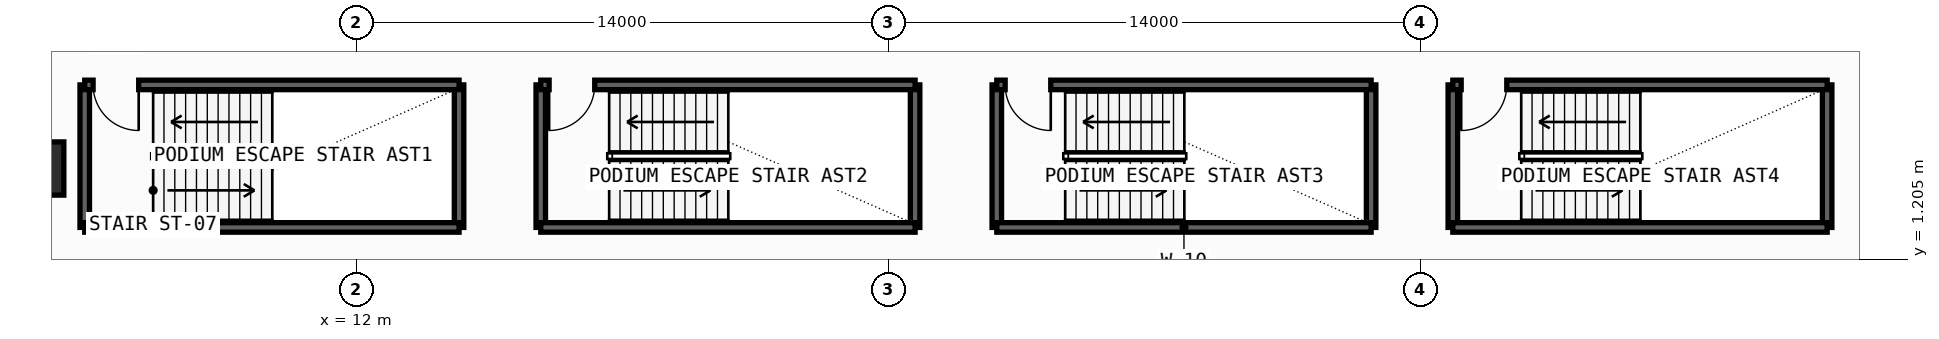
"""IFC4 building model, lengths in metres.
Left out: names, types, materials, properties, quantities, classifications, styles, units other than length and angle.
Written with IfcOpenShell. Run it as: python <this file> out.ifc"""

import sys

from ifc_helpers import new_model, si_unit, direction, frame, frame_2d, origin, origin_2d, place, context, subcontext, project, spatial, rectangle, extrude, element, fill, save


model = new_model("IFC4")
c1 = context("Model", 3, precision=1e-05, world=origin(), true_north=direction((0.0, 1.0)))
c2 = subcontext(c1, "Body", "Model", "MODEL_VIEW")
j1 = project(units=[si_unit("LENGTHUNIT", "METRE"), si_unit("PLANEANGLEUNIT", "RADIAN")], contexts=[c1])
p1 = place(None, origin())
s1 = spatial("IfcSite", under=j1, at=p1, CompositionType="ELEMENT")
p2 = place(p1, origin())
s2 = spatial("IfcBuilding", under=s1, at=p2, CompositionType="ELEMENT")
p3 = place(p2, frame((0.0, 0.0, 13.2)))
s3 = spatial("IfcBuildingStorey", under=s2, at=p3, CompositionType="ELEMENT", Elevation=13.2)
p4 = place(p3, frame((3.6, 3.6, 0.0), z_axis=(0.0, 0.0, 1.0), x_axis=(1.0, 0.0, 0.0)))
e1 = element("IfcColumn", 1, at=p4, inside=s3, PredefinedType="COLUMN", context=c2, shape_type="SweptSolid", body=[
    extrude(rectangle(XDim=1.4, YDim=1.4, at=origin_2d()), origin(), (0.0, 0.0, 1.0), 4.2),
])
for number, where, z_axis, x_axis in (
    (2, (4.85, 2.05, -0.32), (0.0, 0.0, 1.0), (0.0, 1.0, 0.0)),
    (3, (14.7, 2.05, -0.32), (0.0, 0.0, 1.0), (0.0, 1.0, 0.0)),
):
    element("IfcWall", number, at=place(p3, frame(where, z_axis=z_axis, x_axis=x_axis)), inside=s3, PredefinedType="SOLIDWALL", context=c2, shape_type="SweptSolid", body=[
        extrude(rectangle(XDim=3.75, YDim=0.25, at=frame_2d((1.875, 0.0))), origin(), (0.0, 0.0, 1.0), 4.2),
    ])
p5 = place(p3, frame((4.85, 2.05, -0.32), z_axis=(0.0, 0.0, 1.0), x_axis=(1.0, 0.0, 0.0)))
e4 = element("IfcWall", 4, at=p5, inside=s3, PredefinedType="SOLIDWALL", context=c2, shape_type="SweptSolid", body=[
    extrude(rectangle(XDim=9.85, YDim=0.25, at=frame_2d((4.925, 0.0))), origin(), (0.0, 0.0, 1.0), 4.2),
])
p6 = place(p3, frame((4.85, 5.8, -0.32), z_axis=(0.0, 0.0, 1.0), x_axis=(1.0, 0.0, 0.0)))
e5 = element("IfcWall", 5, at=p6, inside=s3, PredefinedType="SOLIDWALL", context=c2, shape_type="SweptSolid", body=[
    extrude(rectangle(XDim=9.85, YDim=0.25, at=frame_2d((4.925, 0.0))), origin(), (0.0, 0.0, 1.0), 4.2),
])
p7 = place(p6, frame((0.22, 0.0, 0.32)))
e6 = element("IfcOpeningElement", 6, at=p7, cuts=e5, PredefinedType="OPENING", context=c2, shape_type="SweptSolid", body=[
    extrude(rectangle(XDim=1.2, YDim=2.2, at=frame_2d((0.6, 1.1))), frame((0.0, 0.135, 0.0), z_axis=(0.0, -1.0, 0.0), x_axis=(1.0, 0.0, 0.0)), (0.0, 0.0, 1.0), 0.27),
])
for number, where, z_axis, x_axis in (
    (7, (16.85, 2.05, -0.32), (0.0, 0.0, 1.0), (0.0, 1.0, 0.0)),
    (8, (26.7, 2.05, -0.32), (0.0, 0.0, 1.0), (0.0, 1.0, 0.0)),
):
    element("IfcWall", number, at=place(p3, frame(where, z_axis=z_axis, x_axis=x_axis)), inside=s3, PredefinedType="SOLIDWALL", context=c2, shape_type="SweptSolid", body=[
        extrude(rectangle(XDim=3.75, YDim=0.25, at=frame_2d((1.875, 0.0))), origin(), (0.0, 0.0, 1.0), 4.2),
    ])
p8 = place(p3, frame((16.85, 2.05, -0.32), z_axis=(0.0, 0.0, 1.0), x_axis=(1.0, 0.0, 0.0)))
e9 = element("IfcWall", 9, at=p8, inside=s3, PredefinedType="SOLIDWALL", context=c2, shape_type="SweptSolid", body=[
    extrude(rectangle(XDim=9.85, YDim=0.25, at=frame_2d((4.925, 0.0))), origin(), (0.0, 0.0, 1.0), 4.2),
])
p9 = place(p3, frame((16.85, 5.8, -0.32), z_axis=(0.0, 0.0, 1.0), x_axis=(1.0, 0.0, 0.0)))
e10 = element("IfcWall", 10, at=p9, inside=s3, PredefinedType="SOLIDWALL", context=c2, shape_type="SweptSolid", body=[
    extrude(rectangle(XDim=9.85, YDim=0.25, at=frame_2d((4.925, 0.0))), origin(), (0.0, 0.0, 1.0), 4.2),
])
p10 = place(p9, frame((0.22, 0.0, 0.32)))
e11 = element("IfcOpeningElement", 11, at=p10, cuts=e10, PredefinedType="OPENING", context=c2, shape_type="SweptSolid", body=[
    extrude(rectangle(XDim=1.2, YDim=2.2, at=frame_2d((0.6, 1.1))), frame((0.0, 0.135, 0.0), z_axis=(0.0, -1.0, 0.0), x_axis=(1.0, 0.0, 0.0)), (0.0, 0.0, 1.0), 0.27),
])
for number, where, z_axis, x_axis in (
    (12, (28.85, 2.05, -0.32), (0.0, 0.0, 1.0), (0.0, 1.0, 0.0)),
    (13, (38.7, 2.05, -0.32), (0.0, 0.0, 1.0), (0.0, 1.0, 0.0)),
):
    element("IfcWall", number, at=place(p3, frame(where, z_axis=z_axis, x_axis=x_axis)), inside=s3, PredefinedType="SOLIDWALL", context=c2, shape_type="SweptSolid", body=[
        extrude(rectangle(XDim=3.75, YDim=0.25, at=frame_2d((1.875, 0.0))), origin(), (0.0, 0.0, 1.0), 4.2),
    ])
p11 = place(p3, frame((28.85, 2.05, -0.32), z_axis=(0.0, 0.0, 1.0), x_axis=(1.0, 0.0, 0.0)))
e14 = element("IfcWall", 14, at=p11, inside=s3, PredefinedType="SOLIDWALL", context=c2, shape_type="SweptSolid", body=[
    extrude(rectangle(XDim=9.85, YDim=0.25, at=frame_2d((4.925, 0.0))), origin(), (0.0, 0.0, 1.0), 4.2),
])
p12 = place(p3, frame((28.85, 5.8, -0.32), z_axis=(0.0, 0.0, 1.0), x_axis=(1.0, 0.0, 0.0)))
e15 = element("IfcWall", 15, at=p12, inside=s3, PredefinedType="SOLIDWALL", context=c2, shape_type="SweptSolid", body=[
    extrude(rectangle(XDim=9.85, YDim=0.25, at=frame_2d((4.925, 0.0))), origin(), (0.0, 0.0, 1.0), 4.2),
])
p13 = place(p12, frame((0.22, 0.0, 0.32)))
e16 = element("IfcOpeningElement", 16, at=p13, cuts=e15, PredefinedType="OPENING", context=c2, shape_type="SweptSolid", body=[
    extrude(rectangle(XDim=1.2, YDim=2.2, at=frame_2d((0.6, 1.1))), frame((0.0, 0.135, 0.0), z_axis=(0.0, -1.0, 0.0), x_axis=(1.0, 0.0, 0.0)), (0.0, 0.0, 1.0), 0.27),
])
for number, where, z_axis, x_axis in (
    (17, (40.85, 2.05, -0.32), (0.0, 0.0, 1.0), (0.0, 1.0, 0.0)),
    (18, (50.7, 2.05, -0.32), (0.0, 0.0, 1.0), (0.0, 1.0, 0.0)),
):
    element("IfcWall", number, at=place(p3, frame(where, z_axis=z_axis, x_axis=x_axis)), inside=s3, PredefinedType="SOLIDWALL", context=c2, shape_type="SweptSolid", body=[
        extrude(rectangle(XDim=3.75, YDim=0.25, at=frame_2d((1.875, 0.0))), origin(), (0.0, 0.0, 1.0), 4.2),
    ])
p14 = place(p3, frame((40.85, 2.05, -0.32), z_axis=(0.0, 0.0, 1.0), x_axis=(1.0, 0.0, 0.0)))
e19 = element("IfcWall", 19, at=p14, inside=s3, PredefinedType="SOLIDWALL", context=c2, shape_type="SweptSolid", body=[
    extrude(rectangle(XDim=9.85, YDim=0.25, at=frame_2d((4.925, 0.0))), origin(), (0.0, 0.0, 1.0), 4.2),
])
p15 = place(p3, frame((40.85, 5.8, -0.32), z_axis=(0.0, 0.0, 1.0), x_axis=(1.0, 0.0, 0.0)))
e20 = element("IfcWall", 20, at=p15, inside=s3, PredefinedType="SOLIDWALL", context=c2, shape_type="SweptSolid", body=[
    extrude(rectangle(XDim=9.85, YDim=0.25, at=frame_2d((4.925, 0.0))), origin(), (0.0, 0.0, 1.0), 4.2),
])
p16 = place(p15, frame((0.22, 0.0, 0.32)))
e21 = element("IfcOpeningElement", 21, at=p16, cuts=e20, PredefinedType="OPENING", context=c2, shape_type="SweptSolid", body=[
    extrude(rectangle(XDim=1.2, YDim=2.2, at=frame_2d((0.6, 1.1))), frame((0.0, 0.135, 0.0), z_axis=(0.0, -1.0, 0.0), x_axis=(1.0, 0.0, 0.0)), (0.0, 0.0, 1.0), 0.27),
])
p17 = place(p7, frame((1.2, 0.0, 0.0), z_axis=(0.0, 0.0, 1.0), x_axis=(-1.0, 0.0, 0.0)))
e22 = element("IfcDoor", 22, at=p17, inside=s3, OperationType="SINGLE_SWING_LEFT", PredefinedType="USERDEFINED", context=c2, shape_type="SweptSolid", body=[
    extrude(rectangle(XDim=1.2, YDim=2.2, at=frame_2d((0.6, 1.1))), frame((0.0, 0.025, 0.0), z_axis=(0.0, -1.0, 0.0), x_axis=(1.0, 0.0, 0.0)), (0.0, 0.0, 1.0), 0.05),
])
fill(e6, e22)
p18 = place(p10, frame((1.2, 0.0, 0.0), z_axis=(0.0, 0.0, 1.0), x_axis=(-1.0, 0.0, 0.0)))
e23 = element("IfcDoor", 23, at=p18, inside=s3, OperationType="SINGLE_SWING_RIGHT", PredefinedType="USERDEFINED", context=c2, shape_type="SweptSolid", body=[
    extrude(rectangle(XDim=1.2, YDim=2.2, at=frame_2d((0.6, 1.1))), frame((0.0, 0.025, 0.0), z_axis=(0.0, -1.0, 0.0), x_axis=(1.0, 0.0, 0.0)), (0.0, 0.0, 1.0), 0.05),
])
fill(e11, e23)
p19 = place(p13, frame((1.2, 0.0, 0.0), z_axis=(0.0, 0.0, 1.0), x_axis=(-1.0, 0.0, 0.0)))
e24 = element("IfcDoor", 24, at=p19, inside=s3, OperationType="SINGLE_SWING_LEFT", PredefinedType="USERDEFINED", context=c2, shape_type="SweptSolid", body=[
    extrude(rectangle(XDim=1.2, YDim=2.2, at=frame_2d((0.6, 1.1))), frame((0.0, 0.025, 0.0), z_axis=(0.0, -1.0, 0.0), x_axis=(1.0, 0.0, 0.0)), (0.0, 0.0, 1.0), 0.05),
])
fill(e16, e24)
p20 = place(p16, frame((1.2, 0.0, 0.0), z_axis=(0.0, 0.0, 1.0), x_axis=(-1.0, 0.0, 0.0)))
e25 = element("IfcDoor", 25, at=p20, inside=s3, OperationType="SINGLE_SWING_RIGHT", PredefinedType="USERDEFINED", context=c2, shape_type="SweptSolid", body=[
    extrude(rectangle(XDim=1.2, YDim=2.2, at=frame_2d((0.6, 1.1))), frame((0.0, 0.025, 0.0), z_axis=(0.0, -1.0, 0.0), x_axis=(1.0, 0.0, 0.0)), (0.0, 0.0, 1.0), 0.05),
])
fill(e21, e25)
save(model, sys.argv[1])
